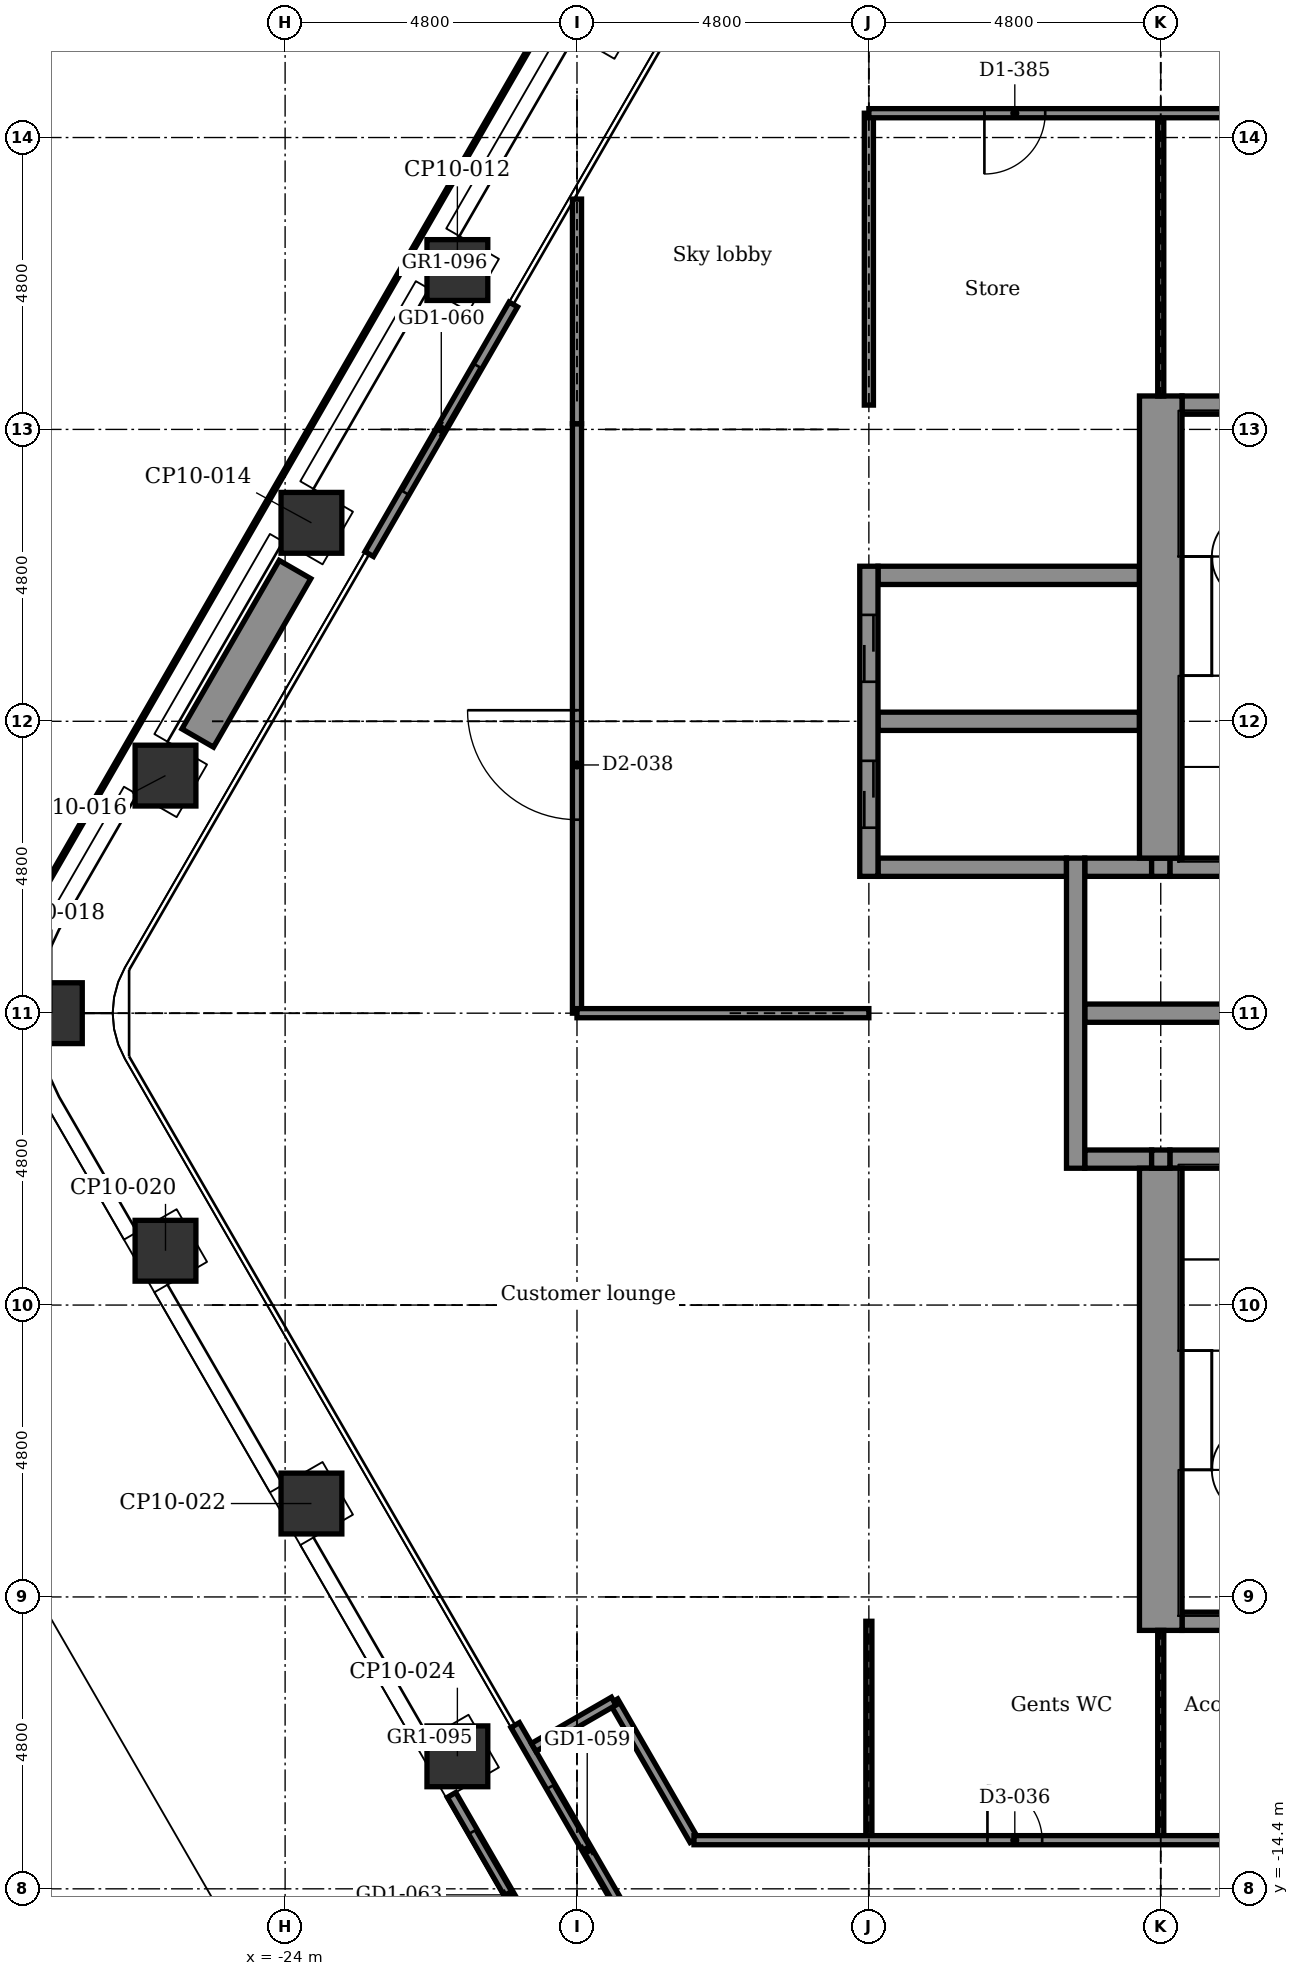
"""IFC4 building model, lengths in metres.
Left out: names, types, materials, properties, quantities, classifications, styles, units other than length and angle.
Written with IfcOpenShell. Run it as: python <this file> out.ifc"""

import sys

from ifc_helpers import new_model, si_unit, direction, frame, frame_2d, origin, origin_2d, place, context, subcontext, project, spatial, rectangle, extrude, element, fill, save


model = new_model("IFC4")
c1 = context("Model", 3, precision=1e-05, world=origin(), true_north=direction((0.0, 1.0)))
c2 = subcontext(c1, "Body", "Model", "MODEL_VIEW")
j1 = project(units=[si_unit("LENGTHUNIT", "METRE"), si_unit("PLANEANGLEUNIT", "RADIAN")], contexts=[c1])
p1 = place(None, origin())
s1 = spatial("IfcSite", under=j1, at=p1, CompositionType="ELEMENT")
p2 = place(p1, origin())
s2 = spatial("IfcBuilding", under=s1, at=p2, CompositionType="ELEMENT")
p3 = place(p2, frame((0.0, 0.0, 133.4)))
s3 = spatial("IfcBuildingStorey", under=s2, at=p3, CompositionType="ELEMENT", Elevation=133.4)
for number, where, z_axis, x_axis in (
    (1, (-21.167, -12.221, -0.15), (0.0, 0.0, 1.0), (0.866, 0.5, 0.0)),
    (2, (-23.567, -8.064, -0.15), (0.0, 0.0, 1.0), (0.866, 0.5, 0.0)),
    (3, (-25.967, -3.907, -0.15), (0.0, 0.0, 1.0), (0.866, 0.5, 0.0)),
    (4, (-27.836, 0.0, -0.15), (0.0, 0.0, 1.0), (1.0, 0.0, 0.0)),
    (5, (-25.967, 3.907, -0.15), (0.0, 0.0, 1.0), (0.5, 0.866, 0.0)),
    (6, (-23.567, 8.064, -0.15), (0.0, 0.0, 1.0), (0.5, 0.866, 0.0)),
    (7, (-21.167, 12.221, -0.15), (0.0, 0.0, 1.0), (0.5, 0.866, 0.0)),
    (8, (-18.767, 16.378, -0.15), (0.0, 0.0, 1.0), (0.5, 0.866, 0.0)),
):
    element("IfcColumn", number, at=place(p3, frame(where, z_axis=z_axis, x_axis=x_axis)), inside=s3, PredefinedType="COLUMN", context=c2, shape_type="SweptSolid", body=[
        extrude(rectangle(XDim=1.0, YDim=1.0, at=origin_2d()), origin(), (0.0, 0.0, 1.0), 5.4),
    ])
p4 = place(p3, frame((-9.25, -10.0, -0.15), z_axis=(0.0, 0.0, 1.0), x_axis=(1.0, 0.0, 0.0)))
e9 = element("IfcWall", 9, at=p4, inside=s3, PredefinedType="STANDARD", context=c2, shape_type="SweptSolid", body=[
    extrude(rectangle(XDim=4.0, YDim=0.3, at=frame_2d((2.0, 0.0))), origin(), (0.0, 0.0, 1.0), 5.4),
])
p5 = place(p3, frame((-10.85, -2.4, -0.15), z_axis=(0.0, 0.0, 1.0), x_axis=(1.0, 0.0, 0.0)))
e10 = element("IfcWall", 10, at=p5, inside=s3, PredefinedType="STANDARD", context=c2, shape_type="SweptSolid", body=[
    extrude(rectangle(XDim=1.1, YDim=0.3, at=frame_2d((0.55, 0.0))), origin(), (0.0, 0.0, 1.0), 5.4),
])
p6 = place(p3, frame((-9.45, -2.4, -0.15), z_axis=(0.0, 0.0, 1.0), x_axis=(1.0, 0.0, 0.0)))
e11 = element("IfcWall", 11, at=p6, inside=s3, PredefinedType="STANDARD", context=c2, shape_type="SweptSolid", body=[
    extrude(rectangle(XDim=1.9, YDim=0.3, at=frame_2d((0.95, 0.0))), origin(), (0.0, 0.0, 1.0), 5.4),
])
p7 = place(p3, frame((-10.85, 0.0, -0.15), z_axis=(0.0, 0.0, 1.0), x_axis=(1.0, 0.0, 0.0)))
e12 = element("IfcWall", 12, at=p7, inside=s3, PredefinedType="STANDARD", context=c2, shape_type="SweptSolid", body=[
    extrude(rectangle(XDim=3.3, YDim=0.3, at=frame_2d((1.65, 0.0))), origin(), (0.0, 0.0, 1.0), 5.4),
])
p8 = place(p3, frame((-14.25, 2.4, -0.15), z_axis=(0.0, 0.0, 1.0), x_axis=(1.0, 0.0, 0.0)))
e13 = element("IfcWall", 13, at=p8, inside=s3, PredefinedType="STANDARD", context=c2, shape_type="SweptSolid", body=[
    extrude(rectangle(XDim=3.1, YDim=0.3, at=frame_2d((1.55, 0.0))), origin(), (0.0, 0.0, 1.0), 4.55),
])
p9 = place(p3, frame((-10.85, 2.4, -0.15), z_axis=(0.0, 0.0, 1.0), x_axis=(1.0, 0.0, 0.0)))
e14 = element("IfcWall", 14, at=p9, inside=s3, PredefinedType="STANDARD", context=c2, shape_type="SweptSolid", body=[
    extrude(rectangle(XDim=1.1, YDim=0.3, at=frame_2d((0.55, 0.0))), origin(), (0.0, 0.0, 1.0), 5.4),
])
p10 = place(p3, frame((-9.45, 2.4, -0.15), z_axis=(0.0, 0.0, 1.0), x_axis=(1.0, 0.0, 0.0)))
e15 = element("IfcWall", 15, at=p10, inside=s3, PredefinedType="STANDARD", context=c2, shape_type="SweptSolid", body=[
    extrude(rectangle(XDim=1.9, YDim=0.3, at=frame_2d((0.95, 0.0))), origin(), (0.0, 0.0, 1.0), 5.4),
])
for number, where, z_axis, x_axis in (
    (16, (-14.25, 4.8, -0.15), (0.0, 0.0, 1.0), (1.0, 0.0, 0.0)),
    (17, (-14.25, 7.2, -0.15), (0.0, 0.0, 1.0), (1.0, 0.0, 0.0)),
):
    element("IfcWall", number, at=place(p3, frame(where, z_axis=z_axis, x_axis=x_axis)), inside=s3, PredefinedType="STANDARD", context=c2, shape_type="SweptSolid", body=[
        extrude(rectangle(XDim=4.3, YDim=0.3, at=frame_2d((2.15, 0.0))), origin(), (0.0, 0.0, 1.0), 4.55),
    ])
p11 = place(p3, frame((-9.25, 10.0, -0.15), z_axis=(0.0, 0.0, 1.0), x_axis=(1.0, 0.0, 0.0)))
e18 = element("IfcWall", 18, at=p11, inside=s3, PredefinedType="STANDARD", context=c2, shape_type="SweptSolid", body=[
    extrude(rectangle(XDim=4.0, YDim=0.3, at=frame_2d((2.0, 0.0))), origin(), (0.0, 0.0, 1.0), 5.4),
])
p12 = place(p3, frame((-14.4, 2.25, -0.15), z_axis=(0.0, 0.0, 1.0), x_axis=(0.0, 1.0, 0.0)))
e19 = element("IfcWall", 19, at=p12, inside=s3, PredefinedType="STANDARD", context=c2, shape_type="SweptSolid", body=[
    extrude(rectangle(XDim=5.1, YDim=0.3, at=frame_2d((2.55, 0.0))), origin(), (0.0, 0.0, 1.0), 4.55),
])
p13 = place(p12, frame((0.8, 0.0, 0.15)))
e20 = element("IfcOpeningElement", 20, at=p13, cuts=e19, PredefinedType="OPENING", context=c2, shape_type="SweptSolid", body=[
    extrude(rectangle(XDim=1.1, YDim=2.1, at=frame_2d((0.55, 1.05))), frame((0.0, 0.16, 0.0), z_axis=(0.0, -1.0, 0.0), x_axis=(1.0, 0.0, 0.0)), (0.0, 0.0, 1.0), 0.32),
])
p14 = place(p12, frame((3.2, 0.0, 0.15)))
e21 = element("IfcOpeningElement", 21, at=p14, cuts=e19, PredefinedType="OPENING", context=c2, shape_type="SweptSolid", body=[
    extrude(rectangle(XDim=1.1, YDim=2.1, at=frame_2d((0.55, 1.05))), frame((0.0, 0.16, 0.0), z_axis=(0.0, -1.0, 0.0), x_axis=(1.0, 0.0, 0.0)), (0.0, 0.0, 1.0), 0.32),
])
p15 = place(p3, frame((-11.0, -2.55, -0.15), z_axis=(0.0, 0.0, 1.0), x_axis=(0.0, 1.0, 0.0)))
e22 = element("IfcWall", 22, at=p15, inside=s3, PredefinedType="STANDARD", context=c2, shape_type="SweptSolid", body=[
    extrude(rectangle(XDim=5.1, YDim=0.3, at=frame_2d((2.55, 0.0))), origin(), (0.0, 0.0, 1.0), 5.4),
])
p16 = place(p3, frame((-9.6, -10.15, -0.15), z_axis=(0.0, 0.0, 1.0), x_axis=(0.0, 1.0, 0.0)))
e23 = element("IfcWall", 23, at=p16, inside=s3, PredefinedType="SHEAR", context=c2, shape_type="SweptSolid", body=[
    extrude(rectangle(XDim=7.6, YDim=0.7, at=frame_2d((3.8, 0.0))), origin(), (0.0, 0.0, 1.0), 5.4),
])
for number, where, z_axis, x_axis in (
    (24, (-9.6, -2.55, -0.15), (0.0, 0.0, 1.0), (0.0, 1.0, 0.0)),
    (25, (-9.6, 2.25, -0.15), (0.0, 0.0, 1.0), (0.0, 1.0, 0.0)),
):
    element("IfcWall", number, at=place(p3, frame(where, z_axis=z_axis, x_axis=x_axis)), inside=s3, PredefinedType="STANDARD", context=c2, shape_type="SweptSolid", body=[
        extrude(rectangle(XDim=0.3, YDim=0.3, at=frame_2d((0.15, 0.0))), origin(), (0.0, 0.0, 1.0), 5.4),
    ])
p17 = place(p3, frame((-9.6, 2.55, -0.15), z_axis=(0.0, 0.0, 1.0), x_axis=(0.0, 1.0, 0.0)))
e26 = element("IfcWall", 26, at=p17, inside=s3, PredefinedType="SHEAR", context=c2, shape_type="SweptSolid", body=[
    extrude(rectangle(XDim=7.6, YDim=0.7, at=frame_2d((3.8, 0.0))), origin(), (0.0, 0.0, 1.0), 5.4),
])
p18 = place(p3, frame((-17.847, -15.812, 0.0), z_axis=(0.0, 0.0, 1.0), x_axis=(-0.5000167099, 0.866015756104, 0.0)))
e27 = element("IfcWall", 27, at=p18, inside=s3, PredefinedType="PARTITIONING", context=c2, shape_type="SweptSolid", body=[
    extrude(rectangle(XDim=4.74, YDim=0.16, at=frame_2d((2.37, 0.0))), origin(), (0.0, 0.0, 1.0), 5.25),
])
p19 = place(p18, frame((1.17, 0.0, 0.0)))
e28 = element("IfcOpeningElement", 28, at=p19, cuts=e27, PredefinedType="OPENING", context=c2, shape_type="SweptSolid", body=[
    extrude(rectangle(XDim=2.4, YDim=2.4, at=frame_2d((1.2, 1.2))), frame((0.0, 0.09, 0.0), z_axis=(0.0, -1.0, 0.0), x_axis=(1.0, 0.0, 0.0)), (0.0, 0.0, 1.0), 0.18),
])
p20 = place(p3, frame((-22.617, 7.55, 0.0), z_axis=(0.0, 0.0, 1.0), x_axis=(0.5000167099, 0.866015756104, 0.0)))
e29 = element("IfcWall", 29, at=p20, inside=s3, PredefinedType="PARTITIONING", context=c2, shape_type="SweptSolid", body=[
    extrude(rectangle(XDim=4.74, YDim=0.16, at=frame_2d((2.37, 0.0))), origin(), (0.0, 0.0, 1.0), 5.25),
])
p21 = place(p20, frame((1.17, 0.0, 0.0)))
e30 = element("IfcOpeningElement", 30, at=p21, cuts=e29, PredefinedType="OPENING", context=c2, shape_type="SweptSolid", body=[
    extrude(rectangle(XDim=2.4, YDim=2.4, at=frame_2d((1.2, 1.2))), frame((0.0, 0.09, 0.0), z_axis=(0.0, -1.0, 0.0), x_axis=(1.0, 0.0, 0.0)), (0.0, 0.0, 1.0), 0.18),
])
p22 = place(p3, frame((-25.437, 4.525, 0.0), z_axis=(0.0, 0.0, 1.0), x_axis=(0.499938187974, 0.866061088033, 0.0)))
e31 = element("IfcWall", 31, at=p22, inside=s3, PredefinedType="USERDEFINED", context=c2, shape_type="SweptSolid", body=[
    extrude(rectangle(XDim=3.2, YDim=0.6, at=frame_2d((1.6, 0.0))), origin(), (0.0, 0.0, 1.0), 0.7),
])
p23 = place(p3, frame((-19.365, -16.143, 0.0), z_axis=(0.0, 0.0, 1.0), x_axis=(-0.499998968938, 0.866025999068, 0.0)))
e32 = element("IfcWall", 32, at=p23, inside=s3, PredefinedType="PARTITIONING", context=c2, shape_type="SweptSolid", body=[
    extrude(rectangle(XDim=3.796, YDim=0.16, at=frame_2d((1.898, 0.0))), origin(), (0.0, 0.0, 1.0), 4.25),
])
p24 = place(p23, frame((0.698, 0.0, 0.0)))
e33 = element("IfcOpeningElement", 33, at=p24, cuts=e32, PredefinedType="OPENING", context=c2, shape_type="SweptSolid", body=[
    extrude(rectangle(XDim=2.4, YDim=2.4, at=frame_2d((1.2, 1.2))), frame((0.0, 0.09, 0.0), z_axis=(0.0, -1.0, 0.0), x_axis=(1.0, 0.0, 0.0)), (0.0, 0.0, 1.0), 0.18),
])
p25 = place(p3, frame((-9.6, -13.6, 0.0), z_axis=(0.0, 0.0, 1.0), x_axis=(0.0, 1.0, 0.0)))
e34 = element("IfcWall", 34, at=p25, inside=s3, PredefinedType="PARTITIONING", context=c2, shape_type="SweptSolid", body=[
    extrude(rectangle(XDim=3.45, YDim=0.1, at=frame_2d((1.725, 0.0))), origin(), (0.0, 0.0, 1.0), 4.566),
])
p26 = place(p3, frame((-9.6, 10.15, 0.0), z_axis=(0.0, 0.0, 1.0), x_axis=(0.0, 1.0, 0.0)))
e35 = element("IfcWall", 35, at=p26, inside=s3, PredefinedType="PARTITIONING", context=c2, shape_type="SweptSolid", body=[
    extrude(rectangle(XDim=4.65, YDim=0.1, at=frame_2d((2.325, 0.0))), origin(), (0.0, 0.0, 1.0), 4.566),
])
p27 = place(p3, frame((-14.4, -13.6, 0.0), z_axis=(0.0, 0.0, 1.0), x_axis=(0.0, 1.0, 0.0)))
e36 = element("IfcWall", 36, at=p27, inside=s3, PredefinedType="PARTITIONING", context=c2, shape_type="SweptSolid", body=[
    extrude(rectangle(XDim=3.6, YDim=0.1, at=frame_2d((1.8, 0.0))), origin(), (0.0, 0.0, 1.0), 4.566),
])
p28 = place(p3, frame((-14.4, 10.0, 0.0), z_axis=(0.0, 0.0, 1.0), x_axis=(0.0, 1.0, 0.0)))
e37 = element("IfcWall", 37, at=p28, inside=s3, PredefinedType="PARTITIONING", context=c2, shape_type="SweptSolid", body=[
    extrude(rectangle(XDim=4.8, YDim=0.15, at=frame_2d((2.4, 0.0))), origin(), (0.0, 0.0, 1.0), 4.566),
])
p29 = place(p3, frame((-19.2, 0.0, 0.0), z_axis=(0.0, 0.0, 1.0), x_axis=(0.0, 1.0, 0.0)))
e38 = element("IfcWall", 38, at=p29, inside=s3, PredefinedType="PARTITIONING", context=c2, shape_type="SweptSolid", body=[
    extrude(rectangle(XDim=9.694, YDim=0.15, at=frame_2d((4.847, 0.0))), origin(), (0.0, 0.0, 1.0), 5.25),
])
p30 = place(p29, frame((3.182, 0.0, 0.0)))
e39 = element("IfcOpeningElement", 39, at=p30, cuts=e38, PredefinedType="OPENING", context=c2, shape_type="SweptSolid", body=[
    extrude(rectangle(XDim=1.8, YDim=2.1, at=frame_2d((0.9, 1.05))), frame((0.0, 0.085, 0.0), z_axis=(0.0, -1.0, 0.0), x_axis=(1.0, 0.0, 0.0)), (0.0, 0.0, 1.0), 0.17),
])
p31 = place(p3, frame((-19.2, 9.694, 0.0), z_axis=(0.0, 0.0, 1.0), x_axis=(0.0, 1.0, 0.0)))
e40 = element("IfcWall", 40, at=p31, inside=s3, PredefinedType="PARTITIONING", context=c2, shape_type="SweptSolid", body=[
    extrude(rectangle(XDim=3.694, YDim=0.15, at=frame_2d((1.847, 0.0))), origin(), (0.0, 0.0, 1.0), 4.94),
])
p32 = place(p3, frame((-18.596, -11.314, 0.0), z_axis=(0.0, 0.0, 1.0), x_axis=(0.499938597367, -0.866060851709, 0.0)))
e41 = element("IfcWall", 41, at=p32, inside=s3, PredefinedType="PARTITIONING", context=c2, shape_type="SweptSolid", body=[
    extrude(rectangle(XDim=2.64, YDim=0.15, at=frame_2d((1.32, 0.0))), origin(), (0.0, 0.0, 1.0), 5.25),
])
p33 = place(p3, frame((-19.912, -12.074, 0.0), z_axis=(0.0, 0.0, 1.0), x_axis=(0.866030456496, 0.499991248344, 0.0)))
e42 = element("IfcWall", 42, at=p33, inside=s3, PredefinedType="PARTITIONING", context=c2, shape_type="SweptSolid", body=[
    extrude(rectangle(XDim=1.52, YDim=0.15, at=frame_2d((0.76, 0.0))), origin(), (0.0, 0.0, 1.0), 5.25),
])
p34 = place(p3, frame((-17.276, -13.6, 0.0), z_axis=(0.0, 0.0, 1.0), x_axis=(1.0, 0.0, 0.0)))
e43 = element("IfcWall", 43, at=p34, inside=s3, PredefinedType="PARTITIONING", context=c2, shape_type="SweptSolid", body=[
    extrude(rectangle(XDim=20.276, YDim=0.15, at=frame_2d((10.138, 0.0))), origin(), (0.0, 0.0, 1.0), 5.25),
])
p35 = place(p34, frame((4.826, 0.0, 0.0)))
e44 = element("IfcOpeningElement", 44, at=p35, cuts=e43, PredefinedType="OPENING", context=c2, shape_type="SweptSolid", body=[
    extrude(rectangle(XDim=0.9, YDim=2.1, at=frame_2d((0.45, 1.05))), frame((0.0, 0.085, 0.0), z_axis=(0.0, -1.0, 0.0), x_axis=(1.0, 0.0, 0.0)), (0.0, 0.0, 1.0), 0.17),
])
p36 = place(p34, frame((9.626, 0.0, 0.0)))
e45 = element("IfcOpeningElement", 45, at=p36, cuts=e43, PredefinedType="OPENING", context=c2, shape_type="SweptSolid", body=[
    extrude(rectangle(XDim=0.9, YDim=2.1, at=frame_2d((0.45, 1.05))), frame((0.0, 0.085, 0.0), z_axis=(0.0, -1.0, 0.0), x_axis=(1.0, 0.0, 0.0)), (0.0, 0.0, 1.0), 0.17),
])
p37 = place(p34, frame((13.361, 0.0, 0.0)))
e46 = element("IfcOpeningElement", 46, at=p37, cuts=e43, PredefinedType="OPENING", context=c2, shape_type="SweptSolid", body=[
    extrude(rectangle(XDim=1.0, YDim=2.1, at=frame_2d((0.5, 1.05))), frame((0.0, 0.085, 0.0), z_axis=(0.0, -1.0, 0.0), x_axis=(1.0, 0.0, 0.0)), (0.0, 0.0, 1.0), 0.17),
])
p38 = place(p3, frame((-19.2, 0.0, 0.0), z_axis=(0.0, 0.0, 1.0), x_axis=(1.0, 0.0, 0.0)))
e47 = element("IfcWall", 47, at=p38, inside=s3, PredefinedType="PARTITIONING", context=c2, shape_type="SweptSolid", body=[
    extrude(rectangle(XDim=4.8, YDim=0.15, at=frame_2d((2.4, 0.0))), origin(), (0.0, 0.0, 1.0), 4.41),
])
p39 = place(p3, frame((-14.4, 14.8, 0.0), z_axis=(0.0, 0.0, 1.0), x_axis=(1.0, 0.0, 0.0)))
e48 = element("IfcWall", 48, at=p39, inside=s3, PredefinedType="PARTITIONING", context=c2, shape_type="SweptSolid", body=[
    extrude(rectangle(XDim=16.8, YDim=0.15, at=frame_2d((8.4, 0.0))), origin(), (0.0, 0.0, 1.0), 5.25),
])
p40 = place(p39, frame((1.9, 0.0, 0.0)))
e49 = element("IfcOpeningElement", 49, at=p40, cuts=e48, PredefinedType="OPENING", context=c2, shape_type="SweptSolid", body=[
    extrude(rectangle(XDim=1.0, YDim=2.1, at=frame_2d((0.5, 1.05))), frame((0.0, 0.085, 0.0), z_axis=(0.0, -1.0, 0.0), x_axis=(1.0, 0.0, 0.0)), (0.0, 0.0, 1.0), 0.17),
])
p41 = place(p39, frame((6.7, 0.0, 0.0)))
e50 = element("IfcOpeningElement", 50, at=p41, cuts=e48, PredefinedType="OPENING", context=c2, shape_type="SweptSolid", body=[
    extrude(rectangle(XDim=1.0, YDim=2.1, at=frame_2d((0.5, 1.05))), frame((0.0, 0.085, 0.0), z_axis=(0.0, -1.0, 0.0), x_axis=(1.0, 0.0, 0.0)), (0.0, 0.0, 1.0), 0.17),
])
p42 = place(p39, frame((11.5, 0.0, 0.0)))
e51 = element("IfcOpeningElement", 51, at=p42, cuts=e48, PredefinedType="OPENING", context=c2, shape_type="SweptSolid", body=[
    extrude(rectangle(XDim=1.0, YDim=2.1, at=frame_2d((0.5, 1.05))), frame((0.0, 0.085, 0.0), z_axis=(0.0, -1.0, 0.0), x_axis=(1.0, 0.0, 0.0)), (0.0, 0.0, 1.0), 0.17),
])
p43 = place(p19, origin())
e52 = element("IfcDoor", 52, at=p43, inside=s3, OperationType="DOUBLE_DOOR_SLIDING", PredefinedType="DOOR", context=c2, shape_type="SweptSolid", body=[
    extrude(rectangle(XDim=2.4, YDim=2.4, at=frame_2d((1.2, 1.2))), frame((0.0, 0.025, 0.0), z_axis=(0.0, -1.0, 0.0), x_axis=(1.0, 0.0, 0.0)), (0.0, 0.0, 1.0), 0.05),
])
fill(e28, e52)
p44 = place(p21, origin())
e53 = element("IfcDoor", 53, at=p44, inside=s3, OperationType="DOUBLE_DOOR_SLIDING", PredefinedType="DOOR", context=c2, shape_type="SweptSolid", body=[
    extrude(rectangle(XDim=2.4, YDim=2.4, at=frame_2d((1.2, 1.2))), frame((0.0, 0.025, 0.0), z_axis=(0.0, -1.0, 0.0), x_axis=(1.0, 0.0, 0.0)), (0.0, 0.0, 1.0), 0.05),
])
fill(e30, e53)
p45 = place(p24, origin())
e54 = element("IfcDoor", 54, at=p45, inside=s3, OperationType="DOUBLE_DOOR_SLIDING", PredefinedType="DOOR", context=c2, shape_type="SweptSolid", body=[
    extrude(rectangle(XDim=2.4, YDim=2.4, at=frame_2d((1.2, 1.2))), frame((0.0, 0.025, 0.0), z_axis=(0.0, -1.0, 0.0), x_axis=(1.0, 0.0, 0.0)), (0.0, 0.0, 1.0), 0.05),
])
fill(e33, e54)
p46 = place(p40, frame((1.0, 0.0, 0.0), z_axis=(0.0, 0.0, 1.0), x_axis=(-1.0, 0.0, 0.0)))
e55 = element("IfcDoor", 55, at=p46, inside=s3, OperationType="SINGLE_SWING_LEFT", PredefinedType="DOOR", context=c2, shape_type="SweptSolid", body=[
    extrude(rectangle(XDim=1.0, YDim=2.1, at=frame_2d((0.5, 1.05))), frame((0.0, 0.025, 0.0), z_axis=(0.0, -1.0, 0.0), x_axis=(1.0, 0.0, 0.0)), (0.0, 0.0, 1.0), 0.05),
])
fill(e49, e55)
p47 = place(p35, origin())
e56 = element("IfcDoor", 56, at=p47, inside=s3, OperationType="SINGLE_SWING_LEFT", PredefinedType="DOOR", context=c2, shape_type="SweptSolid", body=[
    extrude(rectangle(XDim=0.9, YDim=2.1, at=frame_2d((0.45, 1.05))), frame((0.0, 0.025, 0.0), z_axis=(0.0, -1.0, 0.0), x_axis=(1.0, 0.0, 0.0)), (0.0, 0.0, 1.0), 0.05),
])
fill(e44, e56)
p48 = place(p30, origin())
e57 = element("IfcDoor", 57, at=p48, inside=s3, OperationType="SINGLE_SWING_RIGHT", PredefinedType="DOOR", context=c2, shape_type="SweptSolid", body=[
    extrude(rectangle(XDim=1.8, YDim=2.1, at=frame_2d((0.9, 1.05))), frame((0.0, 0.025, 0.0), z_axis=(0.0, -1.0, 0.0), x_axis=(1.0, 0.0, 0.0)), (0.0, 0.0, 1.0), 0.05),
])
fill(e39, e57)
p49 = place(p13, origin())
e58 = element("IfcDoor", 58, at=p49, inside=s3, OperationType="DOUBLE_DOOR_SLIDING", PredefinedType="DOOR", context=c2, shape_type="SweptSolid", body=[
    extrude(rectangle(XDim=1.1, YDim=2.1, at=frame_2d((0.55, 1.05))), frame((0.0, 0.025, 0.0), z_axis=(0.0, -1.0, 0.0), x_axis=(1.0, 0.0, 0.0)), (0.0, 0.0, 1.0), 0.05),
])
fill(e20, e58)
p50 = place(p14, origin())
e59 = element("IfcDoor", 59, at=p50, inside=s3, OperationType="DOUBLE_DOOR_SLIDING", PredefinedType="DOOR", context=c2, shape_type="SweptSolid", body=[
    extrude(rectangle(XDim=1.1, YDim=2.1, at=frame_2d((0.55, 1.05))), frame((0.0, 0.025, 0.0), z_axis=(0.0, -1.0, 0.0), x_axis=(1.0, 0.0, 0.0)), (0.0, 0.0, 1.0), 0.05),
])
fill(e21, e59)
save(model, sys.argv[1])
